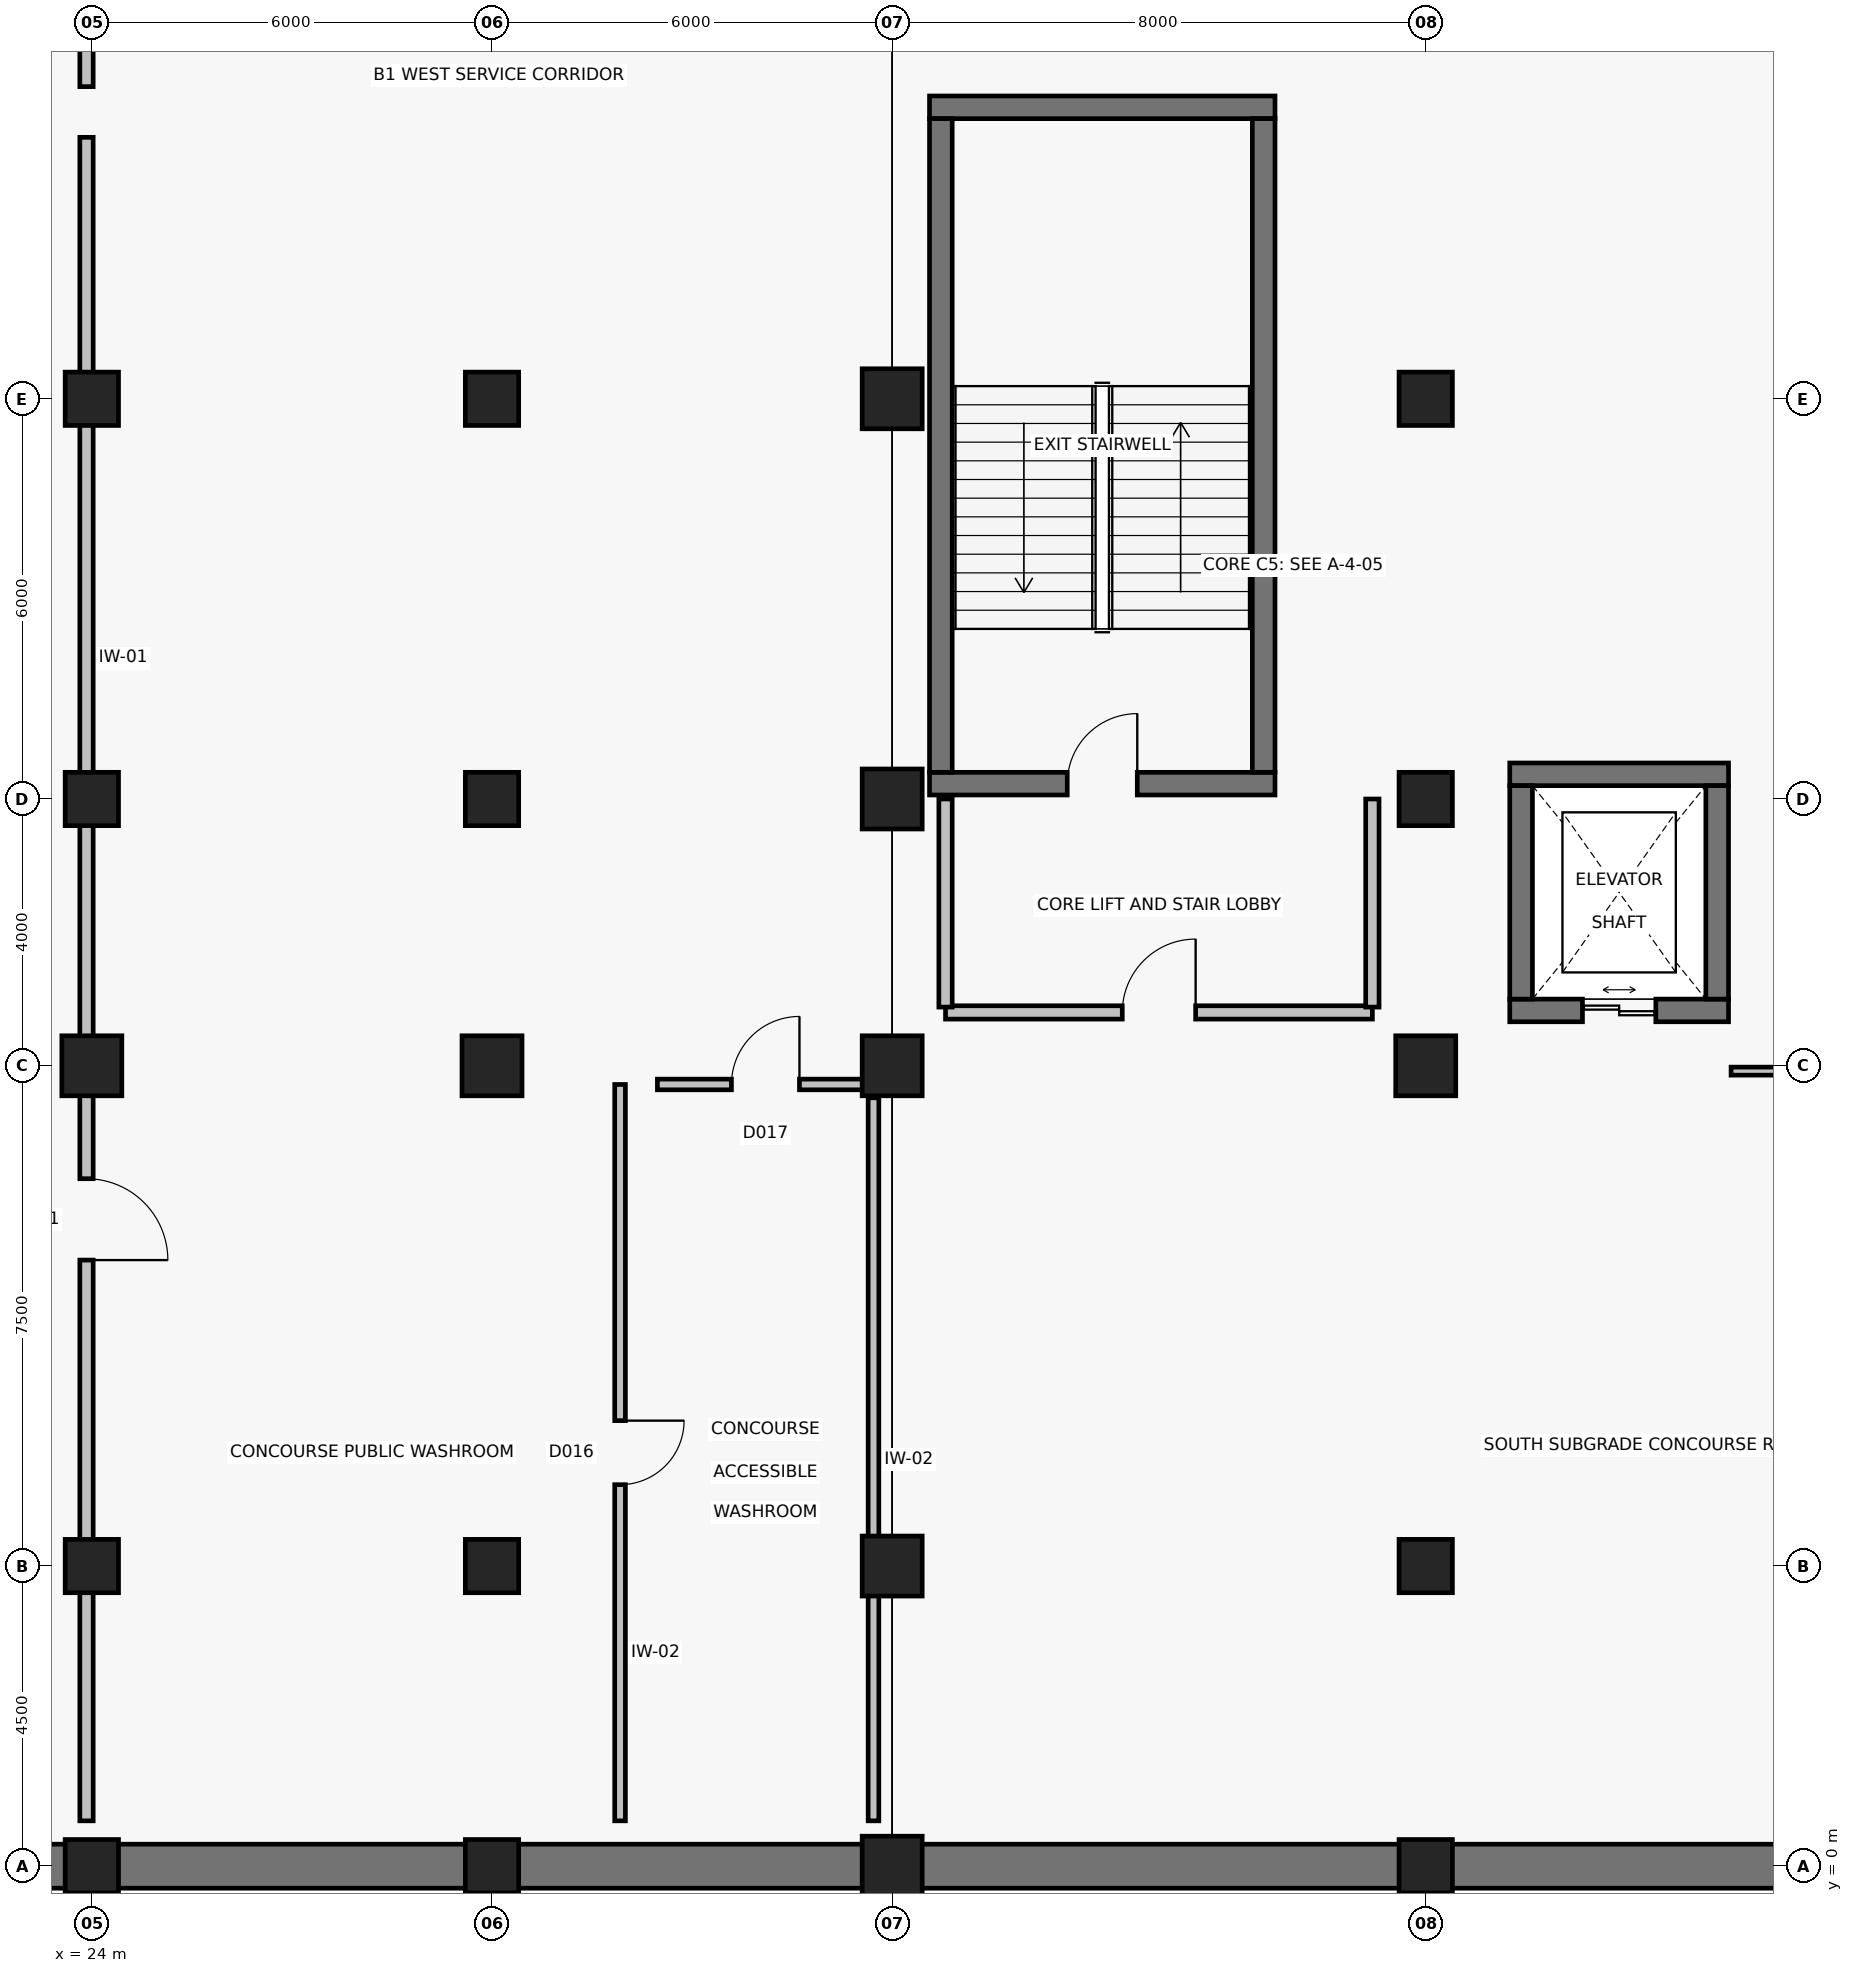
"""IFC4 building model, lengths in metres.
Left out: names, types, materials, properties, quantities, classifications, styles, units other than length and angle.
Written with IfcOpenShell. Run it as: python <this file> out.ifc"""

import sys

from ifc_helpers import new_model, si_unit, direction, frame, frame_2d, origin, origin_2d, place, context, subcontext, project, spatial, rectangle, extrude, element, fill, save


model = new_model("IFC4")
c1 = context("Model", 3, precision=1e-05, world=origin(), true_north=direction((0.0, 1.0)))
c2 = subcontext(c1, "Body", "Model", "MODEL_VIEW")
j1 = project(units=[si_unit("LENGTHUNIT", "METRE"), si_unit("PLANEANGLEUNIT", "RADIAN")], contexts=[c1])
p1 = place(None, origin())
s1 = spatial("IfcSite", under=j1, at=p1, CompositionType="ELEMENT")
p2 = place(p1, origin())
s2 = spatial("IfcBuilding", under=s1, at=p2, CompositionType="ELEMENT")
p3 = place(p2, frame((0.0, 0.0, -4.8)))
s3 = spatial("IfcBuildingStorey", under=s2, at=p3, CompositionType="ELEMENT", Elevation=-4.8)
for number, where, z_axis, x_axis in (
    (1, (24.0, 0.0, 0.0), (0.0, 0.0, 1.0), (1.0, 0.0, 0.0)),
    (2, (24.0, 4.5, 0.0), (0.0, 0.0, 1.0), (1.0, 0.0, 0.0)),
):
    element("IfcColumn", number, at=place(p3, frame(where, z_axis=z_axis, x_axis=x_axis)), inside=s3, PredefinedType="COLUMN", context=c2, shape_type="SweptSolid", body=[
        extrude(rectangle(XDim=0.8, YDim=0.8, at=origin_2d()), origin(), (0.0, 0.0, 1.0), 4.8),
    ])
p4 = place(p3, frame((24.0, 12.0, 0.0), z_axis=(0.0, 0.0, 1.0), x_axis=(1.0, 0.0, 0.0)))
e3 = element("IfcColumn", 3, at=p4, inside=s3, PredefinedType="COLUMN", context=c2, shape_type="SweptSolid", body=[
    extrude(rectangle(XDim=0.9, YDim=0.9, at=origin_2d()), origin(), (0.0, 0.0, 1.0), 4.8),
])
for number, where, z_axis, x_axis in (
    (4, (24.0, 16.0, 0.0), (0.0, 0.0, 1.0), (1.0, 0.0, 0.0)),
    (5, (24.0, 22.0, 0.0), (0.0, 0.0, 1.0), (1.0, 0.0, 0.0)),
    (6, (30.0, 0.0, 0.0), (0.0, 0.0, 1.0), (1.0, 0.0, 0.0)),
    (7, (30.0, 4.5, 0.0), (0.0, 0.0, 1.0), (1.0, 0.0, 0.0)),
):
    element("IfcColumn", number, at=place(p3, frame(where, z_axis=z_axis, x_axis=x_axis)), inside=s3, PredefinedType="COLUMN", context=c2, shape_type="SweptSolid", body=[
        extrude(rectangle(XDim=0.8, YDim=0.8, at=origin_2d()), origin(), (0.0, 0.0, 1.0), 4.8),
    ])
p5 = place(p3, frame((30.0, 12.0, 0.0), z_axis=(0.0, 0.0, 1.0), x_axis=(1.0, 0.0, 0.0)))
e8 = element("IfcColumn", 8, at=p5, inside=s3, PredefinedType="COLUMN", context=c2, shape_type="SweptSolid", body=[
    extrude(rectangle(XDim=0.9, YDim=0.9, at=origin_2d()), origin(), (0.0, 0.0, 1.0), 4.8),
])
for number, where, z_axis, x_axis in (
    (9, (30.0, 16.0, 0.0), (0.0, 0.0, 1.0), (1.0, 0.0, 0.0)),
    (10, (30.0, 22.0, 0.0), (0.0, 0.0, 1.0), (1.0, 0.0, 0.0)),
):
    element("IfcColumn", number, at=place(p3, frame(where, z_axis=z_axis, x_axis=x_axis)), inside=s3, PredefinedType="COLUMN", context=c2, shape_type="SweptSolid", body=[
        extrude(rectangle(XDim=0.8, YDim=0.8, at=origin_2d()), origin(), (0.0, 0.0, 1.0), 4.8),
    ])
for number, where, z_axis, x_axis in (
    (11, (36.0, 0.0, 0.0), (0.0, 0.0, 1.0), (1.0, 0.0, 0.0)),
    (12, (36.0, 4.5, 0.0), (0.0, 0.0, 1.0), (1.0, 0.0, 0.0)),
    (13, (36.0, 12.0, 0.0), (0.0, 0.0, 1.0), (1.0, 0.0, 0.0)),
    (14, (36.0, 16.0, 0.0), (0.0, 0.0, 1.0), (1.0, 0.0, 0.0)),
    (15, (36.0, 22.0, 0.0), (0.0, 0.0, 1.0), (1.0, 0.0, 0.0)),
):
    element("IfcColumn", number, at=place(p3, frame(where, z_axis=z_axis, x_axis=x_axis)), inside=s3, PredefinedType="COLUMN", context=c2, shape_type="SweptSolid", body=[
        extrude(rectangle(XDim=0.9, YDim=0.9, at=origin_2d()), origin(), (0.0, 0.0, 1.0), 4.8),
    ])
for number, where, z_axis, x_axis in (
    (16, (44.0, 0.0, 0.0), (0.0, 0.0, 1.0), (1.0, 0.0, 0.0)),
    (17, (44.0, 4.5, 0.0), (0.0, 0.0, 1.0), (1.0, 0.0, 0.0)),
):
    element("IfcColumn", number, at=place(p3, frame(where, z_axis=z_axis, x_axis=x_axis)), inside=s3, PredefinedType="COLUMN", context=c2, shape_type="SweptSolid", body=[
        extrude(rectangle(XDim=0.8, YDim=0.8, at=origin_2d()), origin(), (0.0, 0.0, 1.0), 4.8),
    ])
p6 = place(p3, frame((44.0, 12.0, 0.0), z_axis=(0.0, 0.0, 1.0), x_axis=(1.0, 0.0, 0.0)))
e18 = element("IfcColumn", 18, at=p6, inside=s3, PredefinedType="COLUMN", context=c2, shape_type="SweptSolid", body=[
    extrude(rectangle(XDim=0.9, YDim=0.9, at=origin_2d()), origin(), (0.0, 0.0, 1.0), 4.8),
])
for number, where, z_axis, x_axis in (
    (19, (44.0, 16.0, 0.0), (0.0, 0.0, 1.0), (1.0, 0.0, 0.0)),
    (20, (44.0, 22.0, 0.0), (0.0, 0.0, 1.0), (1.0, 0.0, 0.0)),
):
    element("IfcColumn", number, at=place(p3, frame(where, z_axis=z_axis, x_axis=x_axis)), inside=s3, PredefinedType="COLUMN", context=c2, shape_type="SweptSolid", body=[
        extrude(rectangle(XDim=0.8, YDim=0.8, at=origin_2d()), origin(), (0.0, 0.0, 1.0), 4.8),
    ])
p7 = place(p3, frame((18.0, 0.0, 0.0), z_axis=(0.0, 0.0, 1.0), x_axis=(1.0, 0.0, 0.0)))
e21 = element("IfcWall", 21, at=p7, inside=s3, PredefinedType="USERDEFINED", context=c2, shape_type="SweptSolid", body=[
    extrude(rectangle(XDim=18.0, YDim=0.66, at=frame_2d((9.0, 0.0))), origin(), (0.0, 0.0, 1.0), 4.4),
])
p8 = place(p3, frame((36.0, 0.0, 0.0), z_axis=(0.0, 0.0, 1.0), x_axis=(1.0, 0.0, 0.0)))
e22 = element("IfcWall", 22, at=p8, inside=s3, PredefinedType="USERDEFINED", context=c2, shape_type="SweptSolid", body=[
    extrude(rectangle(XDim=24.0, YDim=0.66, at=frame_2d((12.0, 0.0))), origin(), (0.0, 0.0, 1.0), 4.4),
])
p9 = place(p3, frame((36.56, 16.23, 0.0), z_axis=(0.0, 0.0, 1.0), x_axis=(1.0, 0.0, 0.0)))
e23 = element("IfcWall", 23, at=p9, inside=s3, PredefinedType="SHEAR", context=c2, shape_type="SweptSolid", body=[
    extrude(rectangle(XDim=5.18, YDim=0.34, at=frame_2d((2.59, 0.0))), origin(), (0.0, 0.0, 1.0), 4.4),
])
p10 = place(p9, frame((2.065, 0.0, 0.0)))
e24 = element("IfcOpeningElement", 24, at=p10, cuts=e23, PredefinedType="OPENING", context=c2, shape_type="SweptSolid", body=[
    extrude(rectangle(XDim=1.05, YDim=2.15, at=frame_2d((0.525, 1.075))), frame((0.0, 0.185, 0.0), z_axis=(0.0, -1.0, 0.0), x_axis=(1.0, 0.0, 0.0)), (0.0, 0.0, 1.0), 0.37),
])
p11 = place(p3, frame((41.74, 26.37, 0.0), z_axis=(0.0, 0.0, 1.0), x_axis=(-1.0, 0.0, 0.0)))
e25 = element("IfcWall", 25, at=p11, inside=s3, PredefinedType="SHEAR", context=c2, shape_type="SweptSolid", body=[
    extrude(rectangle(XDim=5.18, YDim=0.34, at=frame_2d((2.59, 0.0))), origin(), (0.0, 0.0, 1.0), 4.4),
])
for number, where, z_axis, x_axis in (
    (26, (36.73, 26.2, 0.0), (0.0, 0.0, 1.0), (0.0, -1.0, 0.0)),
    (27, (41.57, 16.4, 0.0), (0.0, 0.0, 1.0), (0.0, 1.0, 0.0)),
):
    element("IfcWall", number, at=place(p3, frame(where, z_axis=z_axis, x_axis=x_axis)), inside=s3, PredefinedType="SHEAR", context=c2, shape_type="SweptSolid", body=[
        extrude(rectangle(XDim=9.8, YDim=0.34, at=frame_2d((4.9, 0.0))), origin(), (0.0, 0.0, 1.0), 4.4),
    ])
p12 = place(p3, frame((45.26, 12.83, 0.0), z_axis=(0.0, 0.0, 1.0), x_axis=(1.0, 0.0, 0.0)))
e28 = element("IfcWall", 28, at=p12, inside=s3, PredefinedType="SHEAR", context=c2, shape_type="SweptSolid", body=[
    extrude(rectangle(XDim=3.28, YDim=0.34, at=frame_2d((1.64, 0.0))), origin(), (0.0, 0.0, 1.0), 4.4),
])
p13 = place(p12, frame((1.09, 0.0, 0.0)))
e29 = element("IfcOpeningElement", 29, at=p13, cuts=e28, PredefinedType="OPENING", context=c2, shape_type="SweptSolid", body=[
    extrude(rectangle(XDim=1.1, YDim=2.2, at=frame_2d((0.55, 1.1))), frame((0.0, 0.185, 0.0), z_axis=(0.0, -1.0, 0.0), x_axis=(1.0, 0.0, 0.0)), (0.0, 0.0, 1.0), 0.37),
])
p14 = place(p3, frame((48.54, 16.37, 0.0), z_axis=(0.0, 0.0, 1.0), x_axis=(-1.0, 0.0, 0.0)))
e30 = element("IfcWall", 30, at=p14, inside=s3, PredefinedType="SHEAR", context=c2, shape_type="SweptSolid", body=[
    extrude(rectangle(XDim=3.28, YDim=0.34, at=frame_2d((1.64, 0.0))), origin(), (0.0, 0.0, 1.0), 4.4),
])
for number, where, z_axis, x_axis in (
    (31, (45.43, 16.2, 0.0), (0.0, 0.0, 1.0), (0.0, -1.0, 0.0)),
    (32, (48.37, 13.0, 0.0), (0.0, 0.0, 1.0), (0.0, 1.0, 0.0)),
):
    element("IfcWall", number, at=place(p3, frame(where, z_axis=z_axis, x_axis=x_axis)), inside=s3, PredefinedType="SHEAR", context=c2, shape_type="SweptSolid", body=[
        extrude(rectangle(XDim=3.2, YDim=0.34, at=frame_2d((1.6, 0.0))), origin(), (0.0, 0.0, 1.0), 4.4),
    ])
p15 = place(p3, frame((36.8, 12.8, 0.0), z_axis=(0.0, 0.0, 1.0), x_axis=(1.0, 0.0, 0.0)))
e33 = element("IfcWall", 33, at=p15, inside=s3, PredefinedType="PARTITIONING", context=c2, shape_type="SweptSolid", body=[
    extrude(rectangle(XDim=6.4, YDim=0.2, at=frame_2d((3.2, 0.0))), origin(), (0.0, 0.0, 1.0), 4.033),
])
p16 = place(p15, frame((2.65, 0.0, 0.0)))
e34 = element("IfcOpeningElement", 34, at=p16, cuts=e33, PredefinedType="OPENING", context=c2, shape_type="SweptSolid", body=[
    extrude(rectangle(XDim=1.1, YDim=2.15, at=frame_2d((0.55, 1.075))), frame((0.0, 0.115, 0.0), z_axis=(0.0, -1.0, 0.0), x_axis=(1.0, 0.0, 0.0)), (0.0, 0.0, 1.0), 0.23),
])
for number, where, z_axis, x_axis in (
    (35, (36.8, 16.0, 0.0), (0.0, 0.0, 1.0), (0.0, -1.0, 0.0)),
    (36, (43.2, 12.88, 0.0), (0.0, 0.0, 1.0), (0.0, 1.0, 0.0)),
):
    element("IfcWall", number, at=place(p3, frame(where, z_axis=z_axis, x_axis=x_axis)), inside=s3, PredefinedType="PARTITIONING", context=c2, shape_type="SweptSolid", body=[
        extrude(rectangle(XDim=3.12, YDim=0.2, at=frame_2d((1.56, 0.0))), origin(), (0.0, 0.0, 1.0), 3.18),
    ])
p17 = place(p3, frame((48.578, 11.92, 0.0), z_axis=(0.0, 0.0, 1.0), x_axis=(1.0, 0.0, 0.0)))
e37 = element("IfcWall", 37, at=p17, inside=s3, PredefinedType="PARTITIONING", context=c2, shape_type="SweptSolid", body=[
    extrude(rectangle(XDim=45.794, YDim=0.12, at=frame_2d((22.897, 0.0))), origin(), (0.0, 0.0, 1.0), 3.669),
])
p18 = place(p17, frame((22.357, 0.0, 0.0)))
e38 = element("IfcOpeningElement", 38, at=p18, cuts=e37, PredefinedType="OPENING", context=c2, shape_type="SweptSolid", body=[
    extrude(rectangle(XDim=1.08, YDim=2.15, at=frame_2d((0.54, 1.075))), frame((0.0, 0.075, 0.0), z_axis=(0.0, -1.0, 0.0), x_axis=(1.0, 0.0, 0.0)), (0.0, 0.0, 1.0), 0.15),
])
p19 = place(p3, frame((23.92, 25.92, 0.0), z_axis=(0.0, 0.0, 1.0), x_axis=(0.0, -1.0, 0.0)))
e39 = element("IfcWall", 39, at=p19, inside=s3, PredefinedType="PARTITIONING", context=c2, shape_type="SweptSolid", body=[
    extrude(rectangle(XDim=25.24, YDim=0.2, at=frame_2d((12.62, 0.0))), origin(), (0.0, 0.0, 1.0), 3.741),
])
p20 = place(p19, frame((15.613, 0.0, 0.0)))
e40 = element("IfcOpeningElement", 40, at=p20, cuts=e39, PredefinedType="OPENING", context=c2, shape_type="SweptSolid", body=[
    extrude(rectangle(XDim=1.22, YDim=2.2, at=frame_2d((0.61, 1.1))), frame((0.0, 0.115, 0.0), z_axis=(0.0, -1.0, 0.0), x_axis=(1.0, 0.0, 0.0)), (0.0, 0.0, 1.0), 0.23),
])
p21 = place(p3, frame((23.92, 51.92, 0.0), z_axis=(0.0, 0.0, 1.0), x_axis=(0.0, -1.0, 0.0)))
e41 = element("IfcWall", 41, at=p21, inside=s3, PredefinedType="PARTITIONING", context=c2, shape_type="SweptSolid", body=[
    extrude(rectangle(XDim=25.24, YDim=0.2, at=frame_2d((12.62, 0.0))), origin(), (0.0, 0.0, 1.0), 3.587),
])
p22 = place(p21, frame((5.262, 0.0, 0.0)))
e42 = element("IfcOpeningElement", 42, at=p22, cuts=e41, PredefinedType="OPENING", context=c2, shape_type="SweptSolid", body=[
    extrude(rectangle(XDim=1.32, YDim=2.2, at=frame_2d((0.66, 1.1))), frame((0.0, 0.115, 0.0), z_axis=(0.0, -1.0, 0.0), x_axis=(1.0, 0.0, 0.0)), (0.0, 0.0, 1.0), 0.23),
])
p23 = place(p3, frame((31.92, 11.72, 0.0), z_axis=(0.0, 0.0, 1.0), x_axis=(0.0, -1.0, 0.0)))
e43 = element("IfcWall", 43, at=p23, inside=s3, PredefinedType="PARTITIONING", context=c2, shape_type="SweptSolid", body=[
    extrude(rectangle(XDim=11.04, YDim=0.16, at=frame_2d((5.52, 0.0))), origin(), (0.0, 0.0, 1.0), 3.817),
])
p24 = place(p23, frame((5.04, 0.0, 0.0)))
e44 = element("IfcOpeningElement", 44, at=p24, cuts=e43, PredefinedType="OPENING", context=c2, shape_type="SweptSolid", body=[
    extrude(rectangle(XDim=0.96, YDim=2.1, at=frame_2d((0.48, 1.05))), frame((0.0, 0.095, 0.0), z_axis=(0.0, -1.0, 0.0), x_axis=(1.0, 0.0, 0.0)), (0.0, 0.0, 1.0), 0.19),
])
p25 = place(p3, frame((32.48, 11.72, 0.0), z_axis=(0.0, 0.0, 1.0), x_axis=(1.0, 0.0, 0.0)))
e45 = element("IfcWall", 45, at=p25, inside=s3, PredefinedType="PARTITIONING", context=c2, shape_type="SweptSolid", body=[
    extrude(rectangle(XDim=3.24, YDim=0.16, at=frame_2d((1.62, 0.0))), origin(), (0.0, 0.0, 1.0), 3.669),
])
p26 = place(p25, frame((1.11, 0.0, 0.0)))
e46 = element("IfcOpeningElement", 46, at=p26, cuts=e45, PredefinedType="OPENING", context=c2, shape_type="SweptSolid", body=[
    extrude(rectangle(XDim=1.02, YDim=2.1, at=frame_2d((0.51, 1.05))), frame((0.0, 0.095, 0.0), z_axis=(0.0, -1.0, 0.0), x_axis=(1.0, 0.0, 0.0)), (0.0, 0.0, 1.0), 0.19),
])
p27 = place(p3, frame((35.72, 11.52, 0.0), z_axis=(0.0, 0.0, 1.0), x_axis=(0.0, -1.0, 0.0)))
e47 = element("IfcWall", 47, at=p27, inside=s3, PredefinedType="PARTITIONING", context=c2, shape_type="SweptSolid", body=[
    extrude(rectangle(XDim=10.84, YDim=0.16, at=frame_2d((5.42, 0.0))), origin(), (0.0, 0.0, 1.0), 3.669),
])
p28 = place(p10, origin())
e48 = element("IfcDoor", 48, at=p28, inside=s3, OperationType="SINGLE_SWING_RIGHT", PredefinedType="DOOR", context=c2, shape_type="SweptSolid", body=[
    extrude(rectangle(XDim=1.05, YDim=2.15, at=frame_2d((0.525, 1.075))), frame((0.0, 0.025, 0.0), z_axis=(0.0, -1.0, 0.0), x_axis=(1.0, 0.0, 0.0)), (0.0, 0.0, 1.0), 0.05),
])
fill(e24, e48)
p29 = place(p13, origin())
e49 = element("IfcDoor", 49, at=p29, inside=s3, OperationType="DOUBLE_DOOR_SLIDING", PredefinedType="DOOR", context=c2, shape_type="SweptSolid", body=[
    extrude(rectangle(XDim=1.1, YDim=2.2, at=frame_2d((0.55, 1.1))), frame((0.0, 0.025, 0.0), z_axis=(0.0, -1.0, 0.0), x_axis=(1.0, 0.0, 0.0)), (0.0, 0.0, 1.0), 0.05),
])
fill(e29, e49)
p30 = place(p16, origin())
e50 = element("IfcDoor", 50, at=p30, inside=s3, OperationType="SINGLE_SWING_RIGHT", PredefinedType="DOOR", context=c2, shape_type="SweptSolid", body=[
    extrude(rectangle(XDim=1.1, YDim=2.15, at=frame_2d((0.55, 1.075))), frame((0.0, 0.025, 0.0), z_axis=(0.0, -1.0, 0.0), x_axis=(1.0, 0.0, 0.0)), (0.0, 0.0, 1.0), 0.05),
])
fill(e34, e50)
p31 = place(p20, origin())
e51 = element("IfcDoor", 51, at=p31, inside=s3, OperationType="SINGLE_SWING_RIGHT", PredefinedType="DOOR", context=c2, shape_type="SweptSolid", body=[
    extrude(rectangle(XDim=1.22, YDim=2.2, at=frame_2d((0.61, 1.1))), frame((0.0, 0.025, 0.0), z_axis=(0.0, -1.0, 0.0), x_axis=(1.0, 0.0, 0.0)), (0.0, 0.0, 1.0), 0.05),
])
fill(e40, e51)
p32 = place(p24, origin())
e52 = element("IfcDoor", 52, at=p32, inside=s3, OperationType="SINGLE_SWING_LEFT", PredefinedType="DOOR", context=c2, shape_type="SweptSolid", body=[
    extrude(rectangle(XDim=0.96, YDim=2.1, at=frame_2d((0.48, 1.05))), frame((0.0, 0.025, 0.0), z_axis=(0.0, -1.0, 0.0), x_axis=(1.0, 0.0, 0.0)), (0.0, 0.0, 1.0), 0.05),
])
fill(e44, e52)
p33 = place(p26, origin())
e53 = element("IfcDoor", 53, at=p33, inside=s3, OperationType="SINGLE_SWING_RIGHT", PredefinedType="DOOR", context=c2, shape_type="SweptSolid", body=[
    extrude(rectangle(XDim=1.02, YDim=2.1, at=frame_2d((0.51, 1.05))), frame((0.0, 0.025, 0.0), z_axis=(0.0, -1.0, 0.0), x_axis=(1.0, 0.0, 0.0)), (0.0, 0.0, 1.0), 0.05),
])
fill(e46, e53)
save(model, sys.argv[1])
